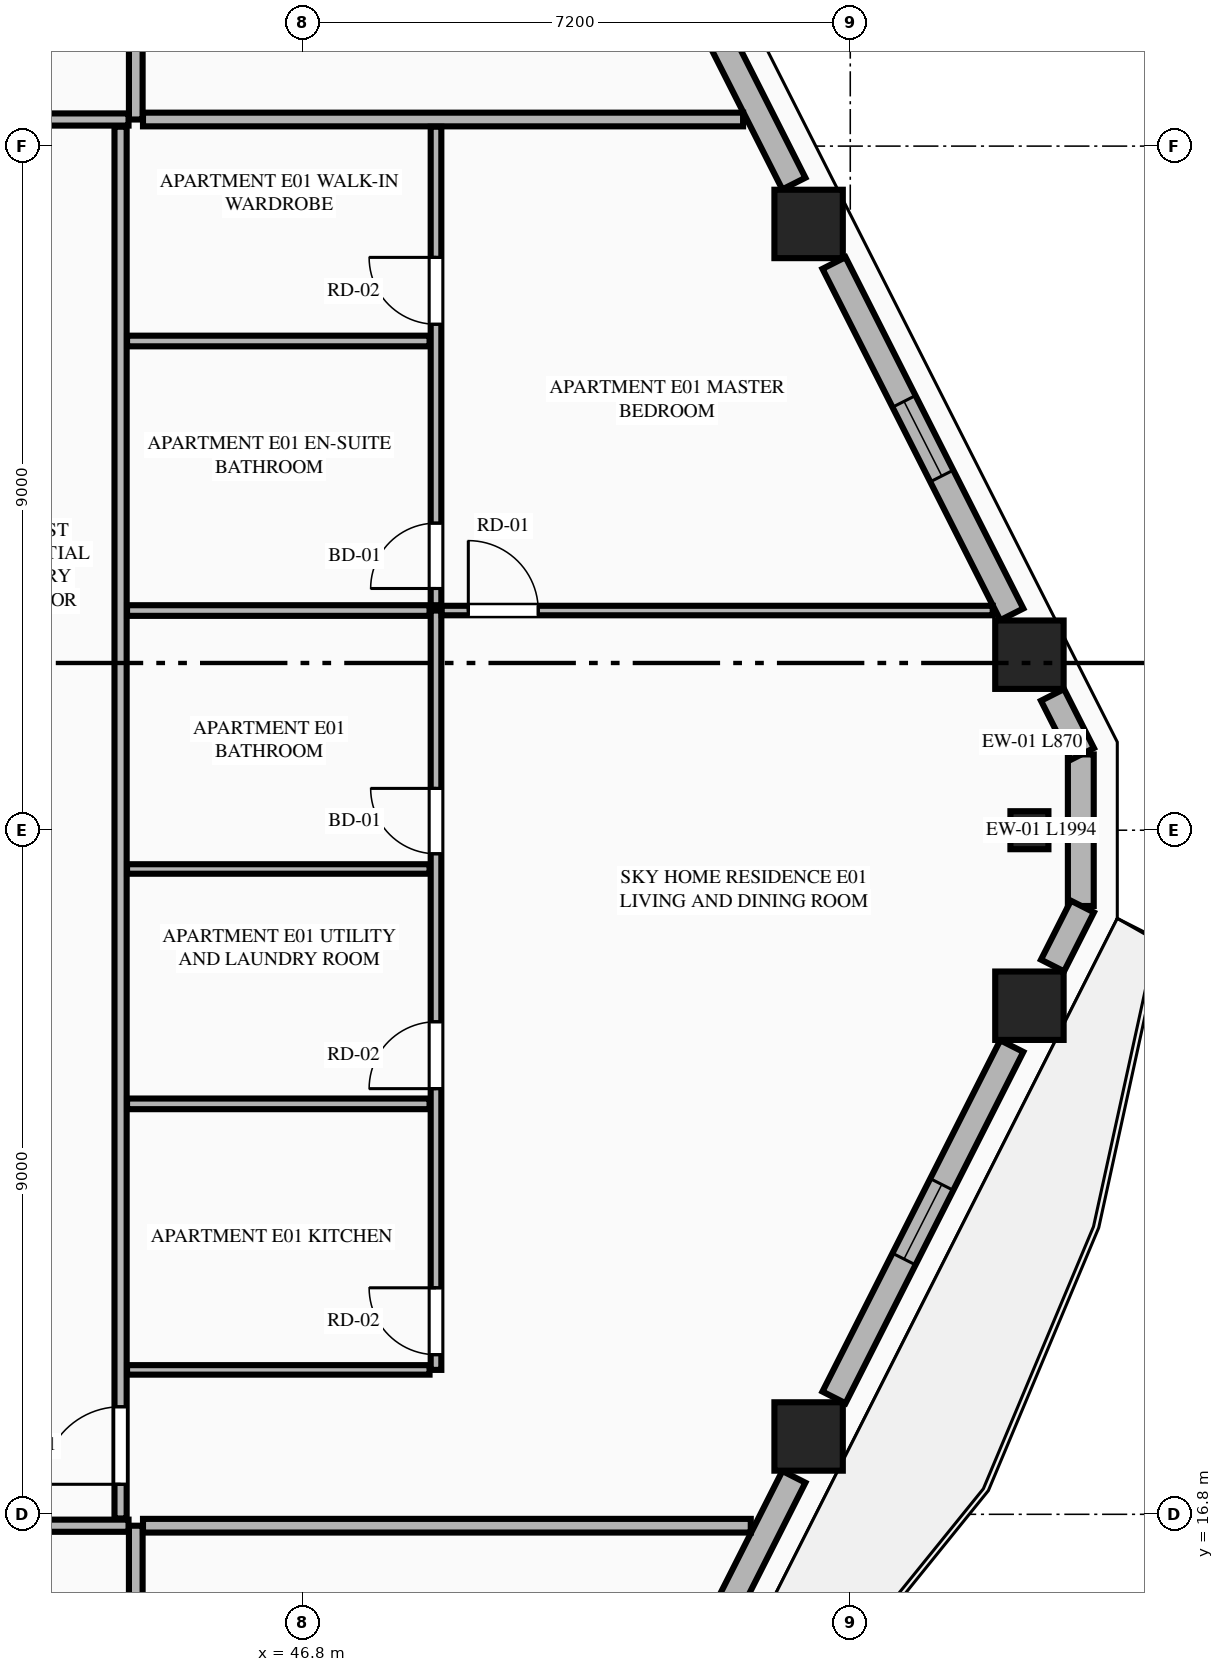
"""IFC4 building model, lengths in metres.
Left out: names, types, materials, properties, quantities, classifications, styles, units other than length and angle.
Written with IfcOpenShell. Run it as: python <this file> out.ifc"""

import sys

from ifc_helpers import new_model, si_unit, direction, frame, frame_2d, origin, origin_2d, place, context, subcontext, project, spatial, rectangle, extrude, element, fill, save


model = new_model("IFC4")
c1 = context("Model", 3, precision=1e-05, world=origin(), true_north=direction((0.0, 1.0)))
c2 = subcontext(c1, "Body", "Model", "MODEL_VIEW")
j1 = project(units=[si_unit("LENGTHUNIT", "METRE"), si_unit("PLANEANGLEUNIT", "RADIAN")], contexts=[c1])
p1 = place(None, origin())
s1 = spatial("IfcSite", under=j1, at=p1, CompositionType="ELEMENT")
p2 = place(p1, origin())
s2 = spatial("IfcBuilding", under=s1, at=p2, CompositionType="ELEMENT")
p3 = place(p2, frame((0.0, 0.0, 164.15)))
s3 = spatial("IfcBuildingStorey", under=s2, at=p3, CompositionType="ELEMENT", Elevation=164.15)
for number, where, z_axis, x_axis in (
    (1, (53.452, 17.824, 0.0), (0.0, 0.0, 1.0), (1.0, 0.0, 0.0)),
    (2, (56.357, 23.491, 0.0), (0.0, 0.0, 1.0), (1.0, 0.0, 0.0)),
    (3, (56.357, 28.109, 0.0), (0.0, 0.0, 1.0), (1.0, 0.0, 0.0)),
    (4, (53.452, 33.776, 0.0), (0.0, 0.0, 1.0), (1.0, 0.0, 0.0)),
):
    element("IfcColumn", number, at=place(p3, frame(where, z_axis=z_axis, x_axis=x_axis)), inside=s3, PredefinedType="COLUMN", context=c2, shape_type="SweptSolid", body=[
        extrude(rectangle(XDim=0.9, YDim=0.9, at=origin_2d()), origin(), (0.0, 0.0, 1.0), 3.55),
    ])
p4 = place(p3, frame((56.357, 25.8, 0.0), z_axis=(0.0, 0.0, 1.0), x_axis=(0.0, 1.0, 0.0)))
e5 = element("IfcColumn", 5, at=p4, inside=s3, PredefinedType="PILASTER", context=c2, shape_type="SweptSolid", body=[
    extrude(rectangle(XDim=0.5, YDim=0.35, at=origin_2d()), origin(), (0.0, 0.0, 1.0), 3.55),
])
p5 = place(p3, frame((57.033, 24.803, 0.0), z_axis=(0.0, 0.0, 1.0), x_axis=(0.0, 1.0, 0.0)))
e6 = element("IfcWall", 6, at=p5, inside=s3, PredefinedType="STANDARD", context=c2, shape_type="SweptSolid", body=[
    extrude(rectangle(XDim=1.994, YDim=0.34, at=frame_2d((0.997, 0.0))), origin(), (0.0, 0.0, 1.0), 3.34),
])
p6 = place(p3, frame((50.818, 12.471, 0.0), z_axis=(0.0, 0.0, 1.0), x_axis=(0.451491174807, 0.892275584711, 0.0)))
e7 = element("IfcWall", 7, at=p6, inside=s3, PredefinedType="STANDARD", context=c2, shape_type="SweptSolid", body=[
    extrude(rectangle(XDim=5.404, YDim=0.34, at=frame_2d((2.702, 0.0))), origin(), (0.0, 0.0, 1.0), 2.797),
])
p7 = place(p6, frame((1.667, 0.0, 0.0)))
e8 = element("IfcOpeningElement", 8, at=p7, cuts=e7, PredefinedType="OPENING", context=c2, shape_type="SweptSolid", body=[
    extrude(rectangle(XDim=1.1, YDim=2.25, at=frame_2d((0.55, 1.125))), frame((0.0, 0.18, 0.0), z_axis=(0.0, -1.0, 0.0), x_axis=(1.0, 0.0, 0.0)), (0.0, 0.0, 1.0), 0.36),
])
p8 = place(p3, frame((53.786, 18.338, 0.0), z_axis=(0.0, 0.0, 1.0), x_axis=(0.451544220963, 0.892248741392, 0.0)))
e9 = element("IfcWall", 9, at=p8, inside=s3, PredefinedType="STANDARD", context=c2, shape_type="SweptSolid", body=[
    extrude(rectangle(XDim=5.18, YDim=0.34, at=frame_2d((2.59, 0.0))), origin(), (0.0, 0.0, 1.0), 2.797),
])
p9 = place(p8, frame((2.04, 0.0, 0.75)))
e10 = element("IfcOpeningElement", 10, at=p9, cuts=e9, PredefinedType="OPENING", context=c2, shape_type="SweptSolid", body=[
    extrude(rectangle(XDim=1.1, YDim=1.897, at=frame_2d((0.55, 0.948))), frame((0.0, 0.18, 0.0), z_axis=(0.0, -1.0, 0.0), x_axis=(1.0, 0.0, 0.0)), (0.0, 0.0, 1.0), 0.36),
])
for number, where, z_axis, x_axis in (
    (11, (56.661, 24.02, 0.0), (0.0, 0.0, 1.0), (0.452, 0.892, 0.0)),
    (12, (57.054, 26.804, 0.0), (0.0, 0.0, 1.0), (-0.452, 0.892, 0.0)),
):
    element("IfcWall", number, at=place(p3, frame(where, z_axis=z_axis, x_axis=x_axis)), inside=s3, PredefinedType="STANDARD", context=c2, shape_type="SweptSolid", body=[
        extrude(rectangle(XDim=0.87, YDim=0.34, at=frame_2d((0.435, 0.0))), origin(), (0.0, 0.0, 1.0), 3.34),
    ])
p10 = place(p3, frame((56.125, 28.64, 0.0), z_axis=(0.0, 0.0, 1.0), x_axis=(-0.451544220963, 0.892248741392, 0.0)))
e13 = element("IfcWall", 13, at=p10, inside=s3, PredefinedType="STANDARD", context=c2, shape_type="SweptSolid", body=[
    extrude(rectangle(XDim=5.18, YDim=0.34, at=frame_2d((2.59, 0.0))), origin(), (0.0, 0.0, 1.0), 2.797),
])
p11 = place(p10, frame((2.04, 0.0, 0.75)))
e14 = element("IfcOpeningElement", 14, at=p11, cuts=e13, PredefinedType="OPENING", context=c2, shape_type="SweptSolid", body=[
    extrude(rectangle(XDim=1.1, YDim=1.897, at=frame_2d((0.55, 0.948))), frame((0.0, 0.18, 0.0), z_axis=(0.0, -1.0, 0.0), x_axis=(1.0, 0.0, 0.0)), (0.0, 0.0, 1.0), 0.36),
])
p12 = place(p3, frame((53.258, 34.307, 0.0), z_axis=(0.0, 0.0, 1.0), x_axis=(-0.451491174807, 0.892275584711, 0.0)))
e15 = element("IfcWall", 15, at=p12, inside=s3, PredefinedType="STANDARD", context=c2, shape_type="SweptSolid", body=[
    extrude(rectangle(XDim=5.404, YDim=0.34, at=frame_2d((2.702, 0.0))), origin(), (0.0, 0.0, 1.0), 2.797),
])
p13 = place(p12, frame((2.152, 0.0, 0.75)))
e16 = element("IfcOpeningElement", 16, at=p13, cuts=e15, PredefinedType="OPENING", context=c2, shape_type="SweptSolid", body=[
    extrude(rectangle(XDim=1.1, YDim=1.897, at=frame_2d((0.55, 0.948))), frame((0.0, 0.18, 0.0), z_axis=(0.0, -1.0, 0.0), x_axis=(1.0, 0.0, 0.0)), (0.0, 0.0, 1.0), 0.36),
])
p14 = place(p3, frame((44.6, 4.105, 0.0), z_axis=(0.0, 0.0, 1.0), x_axis=(0.0, 1.0, 0.0)))
e17 = element("IfcWall", 17, at=p14, inside=s3, PredefinedType="PARTITIONING", context=c2, shape_type="SweptSolid", body=[
    extrude(rectangle(XDim=12.545, YDim=0.18, at=frame_2d((6.272, 0.0))), origin(), (0.0, 0.0, 1.0), 3.34),
])
p15 = place(p3, frame((20.295, 16.65, 0.0), z_axis=(0.0, 0.0, 1.0), x_axis=(1.0, 0.0, 0.0)))
e18 = element("IfcWall", 18, at=p15, inside=s3, PredefinedType="PARTITIONING", context=c2, shape_type="SweptSolid", body=[
    extrude(rectangle(XDim=24.21, YDim=0.16, at=frame_2d((12.105, 0.0))), origin(), (0.0, 0.0, 1.0), 3.34),
])
p16 = place(p15, frame((0.405, 0.0, 0.0)))
e19 = element("IfcOpeningElement", 19, at=p16, cuts=e18, PredefinedType="OPENING", context=c2, shape_type="SweptSolid", body=[
    extrude(rectangle(XDim=1.35, YDim=2.35, at=frame_2d((0.675, 1.175))), frame((0.0, 0.09, 0.0), z_axis=(0.0, -1.0, 0.0), x_axis=(1.0, 0.0, 0.0)), (0.0, 0.0, 1.0), 0.18),
])
p17 = place(p3, frame((44.6, 35.15, 0.0), z_axis=(0.0, 0.0, 1.0), x_axis=(0.0, 1.0, 0.0)))
e20 = element("IfcWall", 20, at=p17, inside=s3, PredefinedType="PARTITIONING", context=c2, shape_type="SweptSolid", body=[
    extrude(rectangle(XDim=12.345, YDim=0.18, at=frame_2d((6.173, 0.0))), origin(), (0.0, 0.0, 1.0), 3.34),
])
p18 = place(p3, frame((20.295, 35.15, 0.0), z_axis=(0.0, 0.0, 1.0), x_axis=(1.0, 0.0, 0.0)))
e21 = element("IfcWall", 21, at=p18, inside=s3, PredefinedType="PARTITIONING", context=c2, shape_type="SweptSolid", body=[
    extrude(rectangle(XDim=24.21, YDim=0.16, at=frame_2d((12.105, 0.0))), origin(), (0.0, 0.0, 1.0), 3.34),
])
p19 = place(p18, frame((0.405, 0.0, 0.0)))
e22 = element("IfcOpeningElement", 22, at=p19, cuts=e21, PredefinedType="OPENING", context=c2, shape_type="SweptSolid", body=[
    extrude(rectangle(XDim=1.35, YDim=2.35, at=frame_2d((0.675, 1.175))), frame((0.0, 0.09, 0.0), z_axis=(0.0, -1.0, 0.0), x_axis=(1.0, 0.0, 0.0)), (0.0, 0.0, 1.0), 0.18),
])
p20 = place(p3, frame((44.695, 16.65, 0.0), z_axis=(0.0, 0.0, 1.0), x_axis=(1.0, 0.0, 0.0)))
e23 = element("IfcWall", 23, at=p20, inside=s3, PredefinedType="PARTITIONING", context=c2, shape_type="SweptSolid", body=[
    extrude(rectangle(XDim=7.996, YDim=0.18, at=frame_2d((3.998, 0.0))), origin(), (0.0, 0.0, 1.0), 3.34),
])
p21 = place(p3, frame((44.695, 35.15, 0.0), z_axis=(0.0, 0.0, 1.0), x_axis=(1.0, 0.0, 0.0)))
e24 = element("IfcWall", 24, at=p21, inside=s3, PredefinedType="PARTITIONING", context=c2, shape_type="SweptSolid", body=[
    extrude(rectangle(XDim=7.895, YDim=0.18, at=frame_2d((3.948, 0.0))), origin(), (0.0, 0.0, 1.0), 3.34),
])
p22 = place(p3, frame((44.4, 16.745, 0.0), z_axis=(0.0, 0.0, 1.0), x_axis=(0.0, 1.0, 0.0)))
e25 = element("IfcWall", 25, at=p22, inside=s3, PredefinedType="PARTITIONING", context=c2, shape_type="SweptSolid", body=[
    extrude(rectangle(XDim=18.31, YDim=0.16, at=frame_2d((9.155, 0.0))), origin(), (0.0, 0.0, 1.0), 3.34),
])
p23 = place(p22, frame((0.45, 0.0, 0.0)))
e26 = element("IfcOpeningElement", 26, at=p23, cuts=e25, PredefinedType="OPENING", context=c2, shape_type="SweptSolid", body=[
    extrude(rectangle(XDim=1.02, YDim=2.25, at=frame_2d((0.51, 1.125))), frame((0.0, 0.09, 0.0), z_axis=(0.0, -1.0, 0.0), x_axis=(1.0, 0.0, 0.0)), (0.0, 0.0, 1.0), 0.18),
])
p24 = place(p3, frame((44.485, 18.7, 0.0), z_axis=(0.0, 0.0, 1.0), x_axis=(1.0, 0.0, 0.0)))
e27 = element("IfcWall", 27, at=p24, inside=s3, PredefinedType="PARTITIONING", context=c2, shape_type="SweptSolid", body=[
    extrude(rectangle(XDim=3.98, YDim=0.125, at=frame_2d((1.99, 0.0))), origin(), (0.0, 0.0, 1.0), 2.722),
])
p25 = place(p3, frame((48.55, 18.7, 0.0), z_axis=(0.0, 0.0, 1.0), x_axis=(0.0, 1.0, 0.0)))
e28 = element("IfcWall", 28, at=p25, inside=s3, PredefinedType="PLUMBINGWALL", context=c2, shape_type="SweptSolid", body=[
    extrude(rectangle(XDim=9.99, YDim=0.14, at=frame_2d((4.995, 0.0))), origin(), (0.0, 0.0, 1.0), 3.34),
])
p26 = place(p25, frame((0.2, 0.0, 0.0)))
e29 = element("IfcOpeningElement", 29, at=p26, cuts=e28, PredefinedType="OPENING", context=c2, shape_type="SweptSolid", body=[
    extrude(rectangle(XDim=0.88, YDim=2.15, at=frame_2d((0.44, 1.075))), frame((0.0, 0.08, 0.0), z_axis=(0.0, -1.0, 0.0), x_axis=(1.0, 0.0, 0.0)), (0.0, 0.0, 1.0), 0.16),
])
p27 = place(p25, frame((3.7, 0.0, 0.0)))
e30 = element("IfcOpeningElement", 30, at=p27, cuts=e28, PredefinedType="OPENING", context=c2, shape_type="SweptSolid", body=[
    extrude(rectangle(XDim=0.88, YDim=2.15, at=frame_2d((0.44, 1.075))), frame((0.0, 0.08, 0.0), z_axis=(0.0, -1.0, 0.0), x_axis=(1.0, 0.0, 0.0)), (0.0, 0.0, 1.0), 0.16),
])
p28 = place(p25, frame((6.79, 0.0, 0.0)))
e31 = element("IfcOpeningElement", 31, at=p28, cuts=e28, PredefinedType="OPENING", context=c2, shape_type="SweptSolid", body=[
    extrude(rectangle(XDim=0.86, YDim=2.1, at=frame_2d((0.43, 1.05))), frame((0.0, 0.08, 0.0), z_axis=(0.0, -1.0, 0.0), x_axis=(1.0, 0.0, 0.0)), (0.0, 0.0, 1.0), 0.16),
])
p29 = place(p3, frame((48.55, 28.76, 0.0), z_axis=(0.0, 0.0, 1.0), x_axis=(0.0, 1.0, 0.0)))
e32 = element("IfcWall", 32, at=p29, inside=s3, PredefinedType="PLUMBINGWALL", context=c2, shape_type="SweptSolid", body=[
    extrude(rectangle(XDim=6.295, YDim=0.14, at=frame_2d((3.147, 0.0))), origin(), (0.0, 0.0, 1.0), 3.34),
])
p30 = place(p29, frame((0.22, 0.0, 0.0)))
e33 = element("IfcOpeningElement", 33, at=p30, cuts=e32, PredefinedType="OPENING", context=c2, shape_type="SweptSolid", body=[
    extrude(rectangle(XDim=0.86, YDim=2.1, at=frame_2d((0.43, 1.05))), frame((0.0, 0.08, 0.0), z_axis=(0.0, -1.0, 0.0), x_axis=(1.0, 0.0, 0.0)), (0.0, 0.0, 1.0), 0.16),
])
p31 = place(p29, frame((3.696, 0.0, 0.0)))
e34 = element("IfcOpeningElement", 34, at=p31, cuts=e32, PredefinedType="OPENING", context=c2, shape_type="SweptSolid", body=[
    extrude(rectangle(XDim=0.88, YDim=2.15, at=frame_2d((0.44, 1.075))), frame((0.0, 0.08, 0.0), z_axis=(0.0, -1.0, 0.0), x_axis=(1.0, 0.0, 0.0)), (0.0, 0.0, 1.0), 0.16),
])
p32 = place(p3, frame((44.485, 28.69, 0.0), z_axis=(0.0, 0.0, 1.0), x_axis=(1.0, 0.0, 0.0)))
e35 = element("IfcWall", 35, at=p32, inside=s3, PredefinedType="PLUMBINGWALL", context=c2, shape_type="SweptSolid", body=[
    extrude(rectangle(XDim=3.98, YDim=0.14, at=frame_2d((1.99, 0.0))), origin(), (0.0, 0.0, 1.0), 3.34),
])
p33 = place(p3, frame((48.625, 28.69, 0.0), z_axis=(0.0, 0.0, 1.0), x_axis=(1.0, 0.0, 0.0)))
e36 = element("IfcWall", 36, at=p33, inside=s3, PredefinedType="PARTITIONING", context=c2, shape_type="SweptSolid", body=[
    extrude(rectangle(XDim=7.249, YDim=0.125, at=frame_2d((3.625, 0.0))), origin(), (0.0, 0.0, 1.0), 3.34),
])
p34 = place(p33, frame((0.35, 0.0, 0.0)))
e37 = element("IfcOpeningElement", 37, at=p34, cuts=e36, PredefinedType="OPENING", context=c2, shape_type="SweptSolid", body=[
    extrude(rectangle(XDim=0.92, YDim=2.15, at=frame_2d((0.46, 1.075))), frame((0.0, 0.073, 0.0), z_axis=(0.0, -1.0, 0.0), x_axis=(1.0, 0.0, 0.0)), (0.0, 0.0, 1.0), 0.145),
])
p35 = place(p3, frame((44.485, 22.2, 0.0), z_axis=(0.0, 0.0, 1.0), x_axis=(1.0, 0.0, 0.0)))
e38 = element("IfcWall", 38, at=p35, inside=s3, PredefinedType="PLUMBINGWALL", context=c2, shape_type="SweptSolid", body=[
    extrude(rectangle(XDim=3.98, YDim=0.14, at=frame_2d((1.99, 0.0))), origin(), (0.0, 0.0, 1.0), 3.34),
])
p36 = place(p3, frame((44.485, 25.29, 0.0), z_axis=(0.0, 0.0, 1.0), x_axis=(1.0, 0.0, 0.0)))
e39 = element("IfcWall", 39, at=p36, inside=s3, PredefinedType="PARTITIONING", context=c2, shape_type="SweptSolid", body=[
    extrude(rectangle(XDim=3.98, YDim=0.125, at=frame_2d((1.99, 0.0))), origin(), (0.0, 0.0, 1.0), 3.34),
])
p37 = place(p3, frame((44.485, 32.236, 0.0), z_axis=(0.0, 0.0, 1.0), x_axis=(1.0, 0.0, 0.0)))
e40 = element("IfcWall", 40, at=p37, inside=s3, PredefinedType="PLUMBINGWALL", context=c2, shape_type="SweptSolid", body=[
    extrude(rectangle(XDim=3.98, YDim=0.14, at=frame_2d((1.99, 0.0))), origin(), (0.0, 0.0, 1.0), 3.34),
])
p38 = place(p9, origin())
e41 = element("IfcWindow", 41, at=p38, inside=s3, PartitioningType="SINGLE_PANEL", PredefinedType="WINDOW", context=c2, shape_type="SweptSolid", body=[
    extrude(rectangle(XDim=1.1, YDim=1.897, at=frame_2d((0.55, 0.948))), frame((0.0, 0.03, 0.0), z_axis=(0.0, -1.0, 0.0), x_axis=(1.0, 0.0, 0.0)), (0.0, 0.0, 1.0), 0.06),
])
fill(e10, e41)
p39 = place(p11, origin())
e42 = element("IfcWindow", 42, at=p39, inside=s3, PartitioningType="SINGLE_PANEL", PredefinedType="WINDOW", context=c2, shape_type="SweptSolid", body=[
    extrude(rectangle(XDim=1.1, YDim=1.897, at=frame_2d((0.55, 0.948))), frame((0.0, 0.03, 0.0), z_axis=(0.0, -1.0, 0.0), x_axis=(1.0, 0.0, 0.0)), (0.0, 0.0, 1.0), 0.06),
])
fill(e14, e42)
p40 = place(p26, origin())
e43 = element("IfcDoor", 43, at=p40, inside=s3, OperationType="SINGLE_SWING_RIGHT", PredefinedType="DOOR", context=c2, shape_type="SweptSolid", body=[
    extrude(rectangle(XDim=0.88, YDim=2.15, at=frame_2d((0.44, 1.075))), frame((0.0, 0.025, 0.0), z_axis=(0.0, -1.0, 0.0), x_axis=(1.0, 0.0, 0.0)), (0.0, 0.0, 1.0), 0.05),
])
fill(e29, e43)
p41 = place(p27, origin())
e44 = element("IfcDoor", 44, at=p41, inside=s3, OperationType="SINGLE_SWING_LEFT", PredefinedType="DOOR", context=c2, shape_type="SweptSolid", body=[
    extrude(rectangle(XDim=0.88, YDim=2.15, at=frame_2d((0.44, 1.075))), frame((0.0, 0.025, 0.0), z_axis=(0.0, -1.0, 0.0), x_axis=(1.0, 0.0, 0.0)), (0.0, 0.0, 1.0), 0.05),
])
fill(e30, e44)
p42 = place(p28, origin())
e45 = element("IfcDoor", 45, at=p42, inside=s3, OperationType="SINGLE_SWING_RIGHT", PredefinedType="DOOR", context=c2, shape_type="SweptSolid", body=[
    extrude(rectangle(XDim=0.86, YDim=2.1, at=frame_2d((0.43, 1.05))), frame((0.0, 0.025, 0.0), z_axis=(0.0, -1.0, 0.0), x_axis=(1.0, 0.0, 0.0)), (0.0, 0.0, 1.0), 0.05),
])
fill(e31, e45)
p43 = place(p30, origin())
e46 = element("IfcDoor", 46, at=p43, inside=s3, OperationType="SINGLE_SWING_LEFT", PredefinedType="DOOR", context=c2, shape_type="SweptSolid", body=[
    extrude(rectangle(XDim=0.86, YDim=2.1, at=frame_2d((0.43, 1.05))), frame((0.0, 0.025, 0.0), z_axis=(0.0, -1.0, 0.0), x_axis=(1.0, 0.0, 0.0)), (0.0, 0.0, 1.0), 0.05),
])
fill(e33, e46)
p44 = place(p31, origin())
e47 = element("IfcDoor", 47, at=p44, inside=s3, OperationType="SINGLE_SWING_RIGHT", PredefinedType="DOOR", context=c2, shape_type="SweptSolid", body=[
    extrude(rectangle(XDim=0.88, YDim=2.15, at=frame_2d((0.44, 1.075))), frame((0.0, 0.025, 0.0), z_axis=(0.0, -1.0, 0.0), x_axis=(1.0, 0.0, 0.0)), (0.0, 0.0, 1.0), 0.05),
])
fill(e34, e47)
p45 = place(p23, origin())
e48 = element("IfcDoor", 48, at=p45, inside=s3, OperationType="SINGLE_SWING_LEFT", PredefinedType="DOOR", context=c2, shape_type="SweptSolid", body=[
    extrude(rectangle(XDim=1.02, YDim=2.25, at=frame_2d((0.51, 1.125))), frame((0.0, 0.025, 0.0), z_axis=(0.0, -1.0, 0.0), x_axis=(1.0, 0.0, 0.0)), (0.0, 0.0, 1.0), 0.05),
])
fill(e26, e48)
p46 = place(p34, origin())
e49 = element("IfcDoor", 49, at=p46, inside=s3, OperationType="SINGLE_SWING_LEFT", PredefinedType="DOOR", context=c2, shape_type="SweptSolid", body=[
    extrude(rectangle(XDim=0.92, YDim=2.15, at=frame_2d((0.46, 1.075))), frame((0.0, 0.025, 0.0), z_axis=(0.0, -1.0, 0.0), x_axis=(1.0, 0.0, 0.0)), (0.0, 0.0, 1.0), 0.05),
])
fill(e37, e49)
save(model, sys.argv[1])
